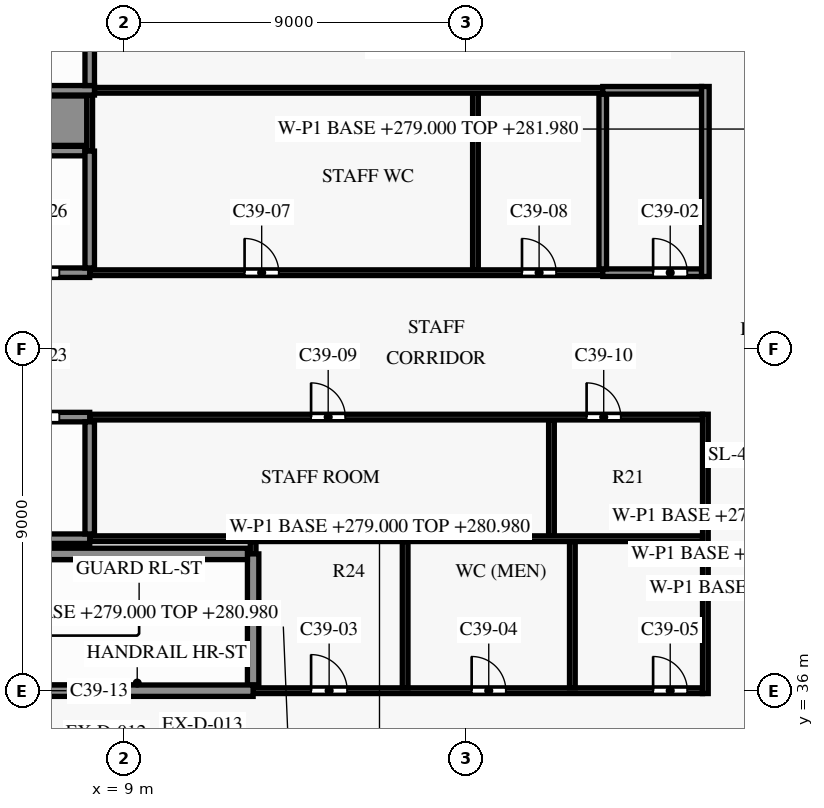
"""IFC4 building model, lengths in metres.
Left out: names, types, materials, properties, quantities, classifications, styles, units other than length and angle.
Written with IfcOpenShell. Run it as: python <this file> out.ifc"""

import sys

from ifc_helpers import new_model, si_unit, direction, frame, frame_2d, origin, place, context, subcontext, project, spatial, rectangle, extrude, element, fill, save


model = new_model("IFC4")
c1 = context("Model", 3, precision=1e-05, world=origin(), true_north=direction((0.0, 1.0)))
c2 = subcontext(c1, "Body", "Model", "MODEL_VIEW")
j1 = project(units=[si_unit("LENGTHUNIT", "METRE"), si_unit("PLANEANGLEUNIT", "RADIAN")], contexts=[c1])
p1 = place(None, origin())
s1 = spatial("IfcSite", under=j1, at=p1, CompositionType="ELEMENT")
p2 = place(p1, origin())
s2 = spatial("IfcBuilding", under=s1, at=p2, CompositionType="ELEMENT")
p3 = place(p2, frame((0.0, 0.0, 279.0)))
s3 = spatial("IfcBuildingStorey", under=s2, at=p3, CompositionType="ELEMENT", Elevation=279.0)
p4 = place(p3, frame((12.4, 36.0, 0.0), z_axis=(0.0, 0.0, 1.0), x_axis=(1.0, 0.0, 0.0)))
e1 = element("IfcWall", 1, at=p4, inside=s3, PredefinedType="SHEAR", context=c2, shape_type="SweptSolid", body=[
    extrude(rectangle(XDim=11.825, YDim=0.15, at=frame_2d((5.913, 0.0))), origin(), (0.0, 0.0, 1.0), 3.5),
])
p5 = place(p4, frame((1.525, 0.0, 0.0)))
e2 = element("IfcOpeningElement", 2, at=p5, cuts=e1, PredefinedType="OPENING", context=c2, shape_type="SweptSolid", body=[
    extrude(rectangle(XDim=0.95, YDim=2.1, at=frame_2d((0.475, 1.05))), frame((0.0, 0.085, 0.0), z_axis=(0.0, -1.0, 0.0), x_axis=(1.0, 0.0, 0.0)), (0.0, 0.0, 1.0), 0.17),
])
p6 = place(p4, frame((5.75, 0.0, 0.0)))
e3 = element("IfcOpeningElement", 3, at=p6, cuts=e1, PredefinedType="OPENING", context=c2, shape_type="SweptSolid", body=[
    extrude(rectangle(XDim=0.9, YDim=2.1, at=frame_2d((0.45, 1.05))), frame((0.0, 0.085, 0.0), z_axis=(0.0, -1.0, 0.0), x_axis=(1.0, 0.0, 0.0)), (0.0, 0.0, 1.0), 0.17),
])
p7 = place(p4, frame((10.525, 0.0, 0.0)))
e4 = element("IfcOpeningElement", 4, at=p7, cuts=e1, PredefinedType="OPENING", context=c2, shape_type="SweptSolid", body=[
    extrude(rectangle(XDim=0.9, YDim=2.1, at=frame_2d((0.45, 1.05))), frame((0.0, 0.085, 0.0), z_axis=(0.0, -1.0, 0.0), x_axis=(1.0, 0.0, 0.0)), (0.0, 0.0, 1.0), 0.17),
])
p8 = place(p3, frame((4.4, 36.0, 0.0), z_axis=(0.0, 0.0, 1.0), x_axis=(1.0, 0.0, 0.0)))
e5 = element("IfcWall", 5, at=p8, inside=s3, PredefinedType="SHEAR", context=c2, shape_type="SweptSolid", body=[
    extrude(rectangle(XDim=8.0, YDim=0.3, at=frame_2d((4.0, 0.0))), origin(), (0.0, 0.0, 1.0), 3.5),
])
p9 = place(p8, frame((0.3, 0.0, 0.0)))
e6 = element("IfcOpeningElement", 6, at=p9, cuts=e5, PredefinedType="OPENING", context=c2, shape_type="SweptSolid", body=[
    extrude(rectangle(XDim=1.5, YDim=2.2, at=frame_2d((0.75, 1.1))), frame((0.0, 0.16, 0.0), z_axis=(0.0, -1.0, 0.0), x_axis=(1.0, 0.0, 0.0)), (0.0, 0.0, 1.0), 0.32),
])
p10 = place(p3, frame((4.55, 39.6, 0.0), z_axis=(0.0, 0.0, 1.0), x_axis=(1.0, 0.0, 0.0)))
e7 = element("IfcWall", 7, at=p10, inside=s3, PredefinedType="SHEAR", context=c2, shape_type="SweptSolid", body=[
    extrude(rectangle(XDim=7.7, YDim=0.3, at=frame_2d((3.85, 0.0))), origin(), (0.0, 0.0, 1.0), 3.5),
])
p11 = place(p3, frame((8.1, 40.0, 0.0), z_axis=(0.0, 0.0, 1.0), x_axis=(1.0, 0.0, 0.0)))
e8 = element("IfcWall", 8, at=p11, inside=s3, PredefinedType="SHEAR", context=c2, shape_type="SweptSolid", body=[
    extrude(rectangle(XDim=16.125, YDim=0.15, at=frame_2d((8.062, 0.0))), origin(), (0.0, 0.0, 1.0), 3.5),
])
p12 = place(p3, frame((0.15, 40.0, 0.0), z_axis=(0.0, 0.0, 1.0), x_axis=(1.0, 0.0, 0.0)))
e9 = element("IfcWall", 9, at=p12, inside=s3, PredefinedType="SHEAR", context=c2, shape_type="SweptSolid", body=[
    extrude(rectangle(XDim=7.95, YDim=0.25, at=frame_2d((3.975, 0.0))), origin(), (0.0, 0.0, 1.0), 3.5),
])
p13 = place(p3, frame((8.1, 43.2, 0.0), z_axis=(0.0, 0.0, 1.0), x_axis=(1.0, 0.0, 0.0)))
e10 = element("IfcWall", 10, at=p13, inside=s3, PredefinedType="SHEAR", context=c2, shape_type="SweptSolid", body=[
    extrude(rectangle(XDim=16.125, YDim=0.15, at=frame_2d((8.062, 0.0))), origin(), (0.0, 0.0, 1.0), 3.5),
])
p14 = place(p13, frame((5.825, 0.0, 0.0)))
e11 = element("IfcOpeningElement", 11, at=p14, cuts=e10, PredefinedType="OPENING", context=c2, shape_type="SweptSolid", body=[
    extrude(rectangle(XDim=0.9, YDim=2.1, at=frame_2d((0.45, 1.05))), frame((0.0, 0.085, 0.0), z_axis=(0.0, -1.0, 0.0), x_axis=(1.0, 0.0, 0.0)), (0.0, 0.0, 1.0), 0.17),
])
p15 = place(p13, frame((13.075, 0.0, 0.0)))
e12 = element("IfcOpeningElement", 12, at=p15, cuts=e10, PredefinedType="OPENING", context=c2, shape_type="SweptSolid", body=[
    extrude(rectangle(XDim=0.9, YDim=2.1, at=frame_2d((0.45, 1.05))), frame((0.0, 0.085, 0.0), z_axis=(0.0, -1.0, 0.0), x_axis=(1.0, 0.0, 0.0)), (0.0, 0.0, 1.0), 0.17),
])
p16 = place(p3, frame((0.125, 43.2, 0.0), z_axis=(0.0, 0.0, 1.0), x_axis=(1.0, 0.0, 0.0)))
e13 = element("IfcWall", 13, at=p16, inside=s3, PredefinedType="SHEAR", context=c2, shape_type="SweptSolid", body=[
    extrude(rectangle(XDim=7.975, YDim=0.25, at=frame_2d((3.988, 0.0))), origin(), (0.0, 0.0, 1.0), 3.5),
])
p17 = place(p16, frame((0.675, 0.0, 0.0)))
e14 = element("IfcOpeningElement", 14, at=p17, cuts=e13, PredefinedType="OPENING", context=c2, shape_type="SweptSolid", body=[
    extrude(rectangle(XDim=1.1, YDim=2.1, at=frame_2d((0.55, 1.05))), frame((0.0, 0.135, 0.0), z_axis=(0.0, -1.0, 0.0), x_axis=(1.0, 0.0, 0.0)), (0.0, 0.0, 1.0), 0.27),
])
p18 = place(p16, frame((3.375, 0.0, 0.0)))
e15 = element("IfcOpeningElement", 15, at=p18, cuts=e13, PredefinedType="OPENING", context=c2, shape_type="SweptSolid", body=[
    extrude(rectangle(XDim=1.1, YDim=2.1, at=frame_2d((0.55, 1.05))), frame((0.0, 0.135, 0.0), z_axis=(0.0, -1.0, 0.0), x_axis=(1.0, 0.0, 0.0)), (0.0, 0.0, 1.0), 0.27),
])
p19 = place(p16, frame((6.075, 0.0, 0.0)))
e16 = element("IfcOpeningElement", 16, at=p19, cuts=e13, PredefinedType="OPENING", context=c2, shape_type="SweptSolid", body=[
    extrude(rectangle(XDim=1.1, YDim=2.1, at=frame_2d((0.55, 1.05))), frame((0.0, 0.135, 0.0), z_axis=(0.0, -1.0, 0.0), x_axis=(1.0, 0.0, 0.0)), (0.0, 0.0, 1.0), 0.27),
])
p20 = place(p3, frame((8.1, 47.0, 0.0), z_axis=(0.0, 0.0, 1.0), x_axis=(1.0, 0.0, 0.0)))
e17 = element("IfcWall", 17, at=p20, inside=s3, PredefinedType="SHEAR", context=c2, shape_type="SweptSolid", body=[
    extrude(rectangle(XDim=13.5, YDim=0.15, at=frame_2d((6.75, 0.0))), origin(), (0.0, 0.0, 1.0), 3.5),
])
p21 = place(p20, frame((4.075, 0.0, 0.0)))
e18 = element("IfcOpeningElement", 18, at=p21, cuts=e17, PredefinedType="OPENING", context=c2, shape_type="SweptSolid", body=[
    extrude(rectangle(XDim=0.9, YDim=2.1, at=frame_2d((0.45, 1.05))), frame((0.0, 0.085, 0.0), z_axis=(0.0, -1.0, 0.0), x_axis=(1.0, 0.0, 0.0)), (0.0, 0.0, 1.0), 0.17),
])
p22 = place(p20, frame((11.375, 0.0, 0.0)))
e19 = element("IfcOpeningElement", 19, at=p22, cuts=e17, PredefinedType="OPENING", context=c2, shape_type="SweptSolid", body=[
    extrude(rectangle(XDim=0.9, YDim=2.1, at=frame_2d((0.45, 1.05))), frame((0.0, 0.085, 0.0), z_axis=(0.0, -1.0, 0.0), x_axis=(1.0, 0.0, 0.0)), (0.0, 0.0, 1.0), 0.17),
])
p23 = place(p3, frame((21.6, 47.0, 0.0), z_axis=(0.0, 0.0, 1.0), x_axis=(1.0, 0.0, 0.0)))
e20 = element("IfcWall", 20, at=p23, inside=s3, PredefinedType="SHEAR", context=c2, shape_type="SweptSolid", body=[
    extrude(rectangle(XDim=2.6, YDim=0.2, at=frame_2d((1.3, 0.0))), origin(), (0.0, 0.0, 1.0), 3.5),
])
p24 = place(p23, frame((1.325, 0.0, 0.0)))
e21 = element("IfcOpeningElement", 21, at=p24, cuts=e20, PredefinedType="OPENING", context=c2, shape_type="SweptSolid", body=[
    extrude(rectangle(XDim=0.9, YDim=2.1, at=frame_2d((0.45, 1.05))), frame((0.0, 0.11, 0.0), z_axis=(0.0, -1.0, 0.0), x_axis=(1.0, 0.0, 0.0)), (0.0, 0.0, 1.0), 0.22),
])
p25 = place(p3, frame((0.125, 47.0, 0.0), z_axis=(0.0, 0.0, 1.0), x_axis=(1.0, 0.0, 0.0)))
e22 = element("IfcWall", 22, at=p25, inside=s3, PredefinedType="SHEAR", context=c2, shape_type="SweptSolid", body=[
    extrude(rectangle(XDim=7.975, YDim=0.25, at=frame_2d((3.988, 0.0))), origin(), (0.0, 0.0, 1.0), 3.5),
])
p26 = place(p25, frame((0.675, 0.0, 0.0)))
e23 = element("IfcOpeningElement", 23, at=p26, cuts=e22, PredefinedType="OPENING", context=c2, shape_type="SweptSolid", body=[
    extrude(rectangle(XDim=1.1, YDim=2.1, at=frame_2d((0.55, 1.05))), frame((0.0, 0.135, 0.0), z_axis=(0.0, -1.0, 0.0), x_axis=(1.0, 0.0, 0.0)), (0.0, 0.0, 1.0), 0.27),
])
p27 = place(p25, frame((3.375, 0.0, 0.0)))
e24 = element("IfcOpeningElement", 24, at=p27, cuts=e22, PredefinedType="OPENING", context=c2, shape_type="SweptSolid", body=[
    extrude(rectangle(XDim=1.1, YDim=2.1, at=frame_2d((0.55, 1.05))), frame((0.0, 0.135, 0.0), z_axis=(0.0, -1.0, 0.0), x_axis=(1.0, 0.0, 0.0)), (0.0, 0.0, 1.0), 0.27),
])
p28 = place(p25, frame((6.075, 0.0, 0.0)))
e25 = element("IfcOpeningElement", 25, at=p28, cuts=e22, PredefinedType="OPENING", context=c2, shape_type="SweptSolid", body=[
    extrude(rectangle(XDim=1.1, YDim=2.1, at=frame_2d((0.55, 1.05))), frame((0.0, 0.135, 0.0), z_axis=(0.0, -1.0, 0.0), x_axis=(1.0, 0.0, 0.0)), (0.0, 0.0, 1.0), 0.27),
])
p29 = place(p3, frame((0.125, 50.2, 0.0), z_axis=(0.0, 0.0, 1.0), x_axis=(1.0, 0.0, 0.0)))
e26 = element("IfcWall", 26, at=p29, inside=s3, PredefinedType="SHEAR", context=c2, shape_type="SweptSolid", body=[
    extrude(rectangle(XDim=7.85, YDim=0.25, at=frame_2d((3.925, 0.0))), origin(), (0.0, 0.0, 1.0), 3.5),
])
p30 = place(p3, frame((-0.125, 51.0, 0.0), z_axis=(0.0, 0.0, 1.0), x_axis=(1.0, 0.0, 0.0)))
e27 = element("IfcWall", 27, at=p30, inside=s3, PredefinedType="SHEAR", context=c2, shape_type="SweptSolid", body=[
    extrude(rectangle(XDim=8.15, YDim=1.3, at=frame_2d((4.075, 0.0))), origin(), (0.0, 0.0, 1.0), 3.5),
])
p31 = place(p3, frame((8.225, 51.8, 0.0), z_axis=(0.0, 0.0, 1.0), x_axis=(1.0, 0.0, 0.0)))
e28 = element("IfcWall", 28, at=p31, inside=s3, PredefinedType="SHEAR", context=c2, shape_type="SweptSolid", body=[
    extrude(rectangle(XDim=13.375, YDim=0.15, at=frame_2d((6.688, 0.0))), origin(), (0.0, 0.0, 1.0), 3.5),
])
p32 = place(p3, frame((21.6, 51.8, 0.0), z_axis=(0.0, 0.0, 1.0), x_axis=(1.0, 0.0, 0.0)))
e29 = element("IfcWall", 29, at=p32, inside=s3, PredefinedType="SHEAR", context=c2, shape_type="SweptSolid", body=[
    extrude(rectangle(XDim=2.6, YDim=0.2, at=frame_2d((1.3, 0.0))), origin(), (0.0, 0.0, 1.0), 3.5),
])
p33 = place(p3, frame((0.125, 51.8, 0.0), z_axis=(0.0, 0.0, 1.0), x_axis=(1.0, 0.0, 0.0)))
e30 = element("IfcWall", 30, at=p33, inside=s3, PredefinedType="SHEAR", context=c2, shape_type="SweptSolid", body=[
    extrude(rectangle(XDim=8.1, YDim=0.25, at=frame_2d((4.05, 0.0))), origin(), (0.0, 0.0, 1.0), 3.5),
])
p34 = place(p3, frame((8.1, 50.2, 0.0), z_axis=(0.0, 0.0, 1.0), x_axis=(0.0, 1.0, 0.0)))
e31 = element("IfcWall", 31, at=p34, inside=s3, PredefinedType="SHEAR", context=c2, shape_type="SweptSolid", body=[
    extrude(rectangle(XDim=1.475, YDim=0.15, at=frame_2d((0.738, 0.0))), origin(), (0.0, 0.0, 1.0), 3.5),
])
p35 = place(p3, frame((8.1, 40.125, 0.0), z_axis=(0.0, 0.0, 1.0), x_axis=(0.0, 1.0, 0.0)))
e32 = element("IfcWall", 32, at=p35, inside=s3, PredefinedType="SHEAR", context=c2, shape_type="SweptSolid", body=[
    extrude(rectangle(XDim=2.95, YDim=0.25, at=frame_2d((1.475, 0.0))), origin(), (0.0, 0.0, 1.0), 3.5),
])
p36 = place(p3, frame((8.1, 47.125, 0.0), z_axis=(0.0, 0.0, 1.0), x_axis=(0.0, 1.0, 0.0)))
e33 = element("IfcWall", 33, at=p36, inside=s3, PredefinedType="SHEAR", context=c2, shape_type="SweptSolid", body=[
    extrude(rectangle(XDim=3.075, YDim=0.25, at=frame_2d((1.538, 0.0))), origin(), (0.0, 0.0, 1.0), 3.5),
])
p37 = place(p3, frame((8.1, 51.925, 0.0), z_axis=(0.0, 0.0, 1.0), x_axis=(0.0, 1.0, 0.0)))
e34 = element("IfcWall", 34, at=p37, inside=s3, PredefinedType="SHEAR", context=c2, shape_type="SweptSolid", body=[
    extrude(rectangle(XDim=2.95, YDim=0.25, at=frame_2d((1.475, 0.0))), origin(), (0.0, 0.0, 1.0), 3.5),
])
p38 = place(p3, frame((12.4, 39.6, 0.0), z_axis=(0.0, 0.0, 1.0), x_axis=(0.0, 1.0, 0.0)))
e35 = element("IfcWall", 35, at=p38, inside=s3, PredefinedType="SHEAR", context=c2, shape_type="SweptSolid", body=[
    extrude(rectangle(XDim=0.325, YDim=0.15, at=frame_2d((0.163, 0.0))), origin(), (0.0, 0.0, 1.0), 3.5),
])
p39 = place(p3, frame((12.4, 36.15, 0.0), z_axis=(0.0, 0.0, 1.0), x_axis=(0.0, 1.0, 0.0)))
e36 = element("IfcWall", 36, at=p39, inside=s3, PredefinedType="SHEAR", context=c2, shape_type="SweptSolid", body=[
    extrude(rectangle(XDim=3.45, YDim=0.3, at=frame_2d((1.725, 0.0))), origin(), (0.0, 0.0, 1.0), 3.5),
])
p40 = place(p3, frame((16.4, 36.075, 0.0), z_axis=(0.0, 0.0, 1.0), x_axis=(0.0, 1.0, 0.0)))
e37 = element("IfcWall", 37, at=p40, inside=s3, PredefinedType="SHEAR", context=c2, shape_type="SweptSolid", body=[
    extrude(rectangle(XDim=3.85, YDim=0.15, at=frame_2d((1.925, 0.0))), origin(), (0.0, 0.0, 1.0), 3.5),
])
p41 = place(p3, frame((18.25, 47.075, 0.0), z_axis=(0.0, 0.0, 1.0), x_axis=(0.0, 1.0, 0.0)))
e38 = element("IfcWall", 38, at=p41, inside=s3, PredefinedType="SHEAR", context=c2, shape_type="SweptSolid", body=[
    extrude(rectangle(XDim=4.65, YDim=0.15, at=frame_2d((2.325, 0.0))), origin(), (0.0, 0.0, 1.0), 3.5),
])
p42 = place(p3, frame((20.25, 40.075, 0.0), z_axis=(0.0, 0.0, 1.0), x_axis=(0.0, 1.0, 0.0)))
e39 = element("IfcWall", 39, at=p42, inside=s3, PredefinedType="SHEAR", context=c2, shape_type="SweptSolid", body=[
    extrude(rectangle(XDim=3.05, YDim=0.15, at=frame_2d((1.525, 0.0))), origin(), (0.0, 0.0, 1.0), 3.5),
])
p43 = place(p3, frame((20.8, 36.075, 0.0), z_axis=(0.0, 0.0, 1.0), x_axis=(0.0, 1.0, 0.0)))
e40 = element("IfcWall", 40, at=p43, inside=s3, PredefinedType="SHEAR", context=c2, shape_type="SweptSolid", body=[
    extrude(rectangle(XDim=3.85, YDim=0.15, at=frame_2d((1.925, 0.0))), origin(), (0.0, 0.0, 1.0), 3.5),
])
p44 = place(p3, frame((21.6, 47.1, 0.0), z_axis=(0.0, 0.0, 1.0), x_axis=(0.0, 1.0, 0.0)))
e41 = element("IfcWall", 41, at=p44, inside=s3, PredefinedType="SHEAR", context=c2, shape_type="SweptSolid", body=[
    extrude(rectangle(XDim=4.6, YDim=0.2, at=frame_2d((2.3, 0.0))), origin(), (0.0, 0.0, 1.0), 3.5),
])
p45 = place(p3, frame((24.3, 35.925, 0.0), z_axis=(0.0, 0.0, 1.0), x_axis=(0.0, 1.0, 0.0)))
e42 = element("IfcWall", 42, at=p45, inside=s3, PredefinedType="SHEAR", context=c2, shape_type="SweptSolid", body=[
    extrude(rectangle(XDim=7.35, YDim=0.15, at=frame_2d((3.675, 0.0))), origin(), (0.0, 0.0, 1.0), 3.5),
])
p46 = place(p3, frame((24.3, 46.9, 0.0), z_axis=(0.0, 0.0, 1.0), x_axis=(0.0, 1.0, 0.0)))
e43 = element("IfcWall", 43, at=p46, inside=s3, PredefinedType="SHEAR", context=c2, shape_type="SweptSolid", body=[
    extrude(rectangle(XDim=5.0, YDim=0.2, at=frame_2d((2.5, 0.0))), origin(), (0.0, 0.0, 1.0), 3.5),
])
p47 = place(p24, origin())
e44 = element("IfcDoor", 44, at=p47, inside=s3, OperationType="SINGLE_SWING_LEFT", PredefinedType="DOOR", context=c2, shape_type="SweptSolid", body=[
    extrude(rectangle(XDim=0.9, YDim=2.1, at=frame_2d((0.45, 1.05))), frame((0.0, 0.025, 0.0), z_axis=(0.0, -1.0, 0.0), x_axis=(1.0, 0.0, 0.0)), (0.0, 0.0, 1.0), 0.05),
])
fill(e21, e44)
p48 = place(p5, origin())
e45 = element("IfcDoor", 45, at=p48, inside=s3, OperationType="SINGLE_SWING_RIGHT", PredefinedType="DOOR", context=c2, shape_type="SweptSolid", body=[
    extrude(rectangle(XDim=0.95, YDim=2.1, at=frame_2d((0.475, 1.05))), frame((0.0, 0.025, 0.0), z_axis=(0.0, -1.0, 0.0), x_axis=(1.0, 0.0, 0.0)), (0.0, 0.0, 1.0), 0.05),
])
fill(e2, e45)
p49 = place(p6, origin())
e46 = element("IfcDoor", 46, at=p49, inside=s3, OperationType="SINGLE_SWING_LEFT", PredefinedType="DOOR", context=c2, shape_type="SweptSolid", body=[
    extrude(rectangle(XDim=0.9, YDim=2.1, at=frame_2d((0.45, 1.05))), frame((0.0, 0.025, 0.0), z_axis=(0.0, -1.0, 0.0), x_axis=(1.0, 0.0, 0.0)), (0.0, 0.0, 1.0), 0.05),
])
fill(e3, e46)
p50 = place(p7, origin())
e47 = element("IfcDoor", 47, at=p50, inside=s3, OperationType="SINGLE_SWING_RIGHT", PredefinedType="DOOR", context=c2, shape_type="SweptSolid", body=[
    extrude(rectangle(XDim=0.9, YDim=2.1, at=frame_2d((0.45, 1.05))), frame((0.0, 0.025, 0.0), z_axis=(0.0, -1.0, 0.0), x_axis=(1.0, 0.0, 0.0)), (0.0, 0.0, 1.0), 0.05),
])
fill(e4, e47)
p51 = place(p21, origin())
e48 = element("IfcDoor", 48, at=p51, inside=s3, OperationType="SINGLE_SWING_LEFT", PredefinedType="DOOR", context=c2, shape_type="SweptSolid", body=[
    extrude(rectangle(XDim=0.9, YDim=2.1, at=frame_2d((0.45, 1.05))), frame((0.0, 0.025, 0.0), z_axis=(0.0, -1.0, 0.0), x_axis=(1.0, 0.0, 0.0)), (0.0, 0.0, 1.0), 0.05),
])
fill(e18, e48)
p52 = place(p22, origin())
e49 = element("IfcDoor", 49, at=p52, inside=s3, OperationType="SINGLE_SWING_RIGHT", PredefinedType="DOOR", context=c2, shape_type="SweptSolid", body=[
    extrude(rectangle(XDim=0.9, YDim=2.1, at=frame_2d((0.45, 1.05))), frame((0.0, 0.025, 0.0), z_axis=(0.0, -1.0, 0.0), x_axis=(1.0, 0.0, 0.0)), (0.0, 0.0, 1.0), 0.05),
])
fill(e19, e49)
p53 = place(p14, origin())
e50 = element("IfcDoor", 50, at=p53, inside=s3, OperationType="SINGLE_SWING_RIGHT", PredefinedType="DOOR", context=c2, shape_type="SweptSolid", body=[
    extrude(rectangle(XDim=0.9, YDim=2.1, at=frame_2d((0.45, 1.05))), frame((0.0, 0.025, 0.0), z_axis=(0.0, -1.0, 0.0), x_axis=(1.0, 0.0, 0.0)), (0.0, 0.0, 1.0), 0.05),
])
fill(e11, e50)
p54 = place(p15, origin())
e51 = element("IfcDoor", 51, at=p54, inside=s3, OperationType="SINGLE_SWING_LEFT", PredefinedType="DOOR", context=c2, shape_type="SweptSolid", body=[
    extrude(rectangle(XDim=0.9, YDim=2.1, at=frame_2d((0.45, 1.05))), frame((0.0, 0.025, 0.0), z_axis=(0.0, -1.0, 0.0), x_axis=(1.0, 0.0, 0.0)), (0.0, 0.0, 1.0), 0.05),
])
fill(e12, e51)
p55 = place(p19, origin())
e52 = element("IfcDoor", 52, at=p55, inside=s3, OperationType="DOUBLE_DOOR_SLIDING", PredefinedType="DOOR", context=c2, shape_type="SweptSolid", body=[
    extrude(rectangle(XDim=1.1, YDim=2.1, at=frame_2d((0.55, 1.05))), frame((0.0, 0.025, 0.0), z_axis=(0.0, -1.0, 0.0), x_axis=(1.0, 0.0, 0.0)), (0.0, 0.0, 1.0), 0.05),
])
fill(e16, e52)
p56 = place(p28, origin())
e53 = element("IfcDoor", 53, at=p56, inside=s3, OperationType="DOUBLE_DOOR_SLIDING", PredefinedType="DOOR", context=c2, shape_type="SweptSolid", body=[
    extrude(rectangle(XDim=1.1, YDim=2.1, at=frame_2d((0.55, 1.05))), frame((0.0, 0.025, 0.0), z_axis=(0.0, -1.0, 0.0), x_axis=(1.0, 0.0, 0.0)), (0.0, 0.0, 1.0), 0.05),
])
fill(e25, e53)
save(model, sys.argv[1])
